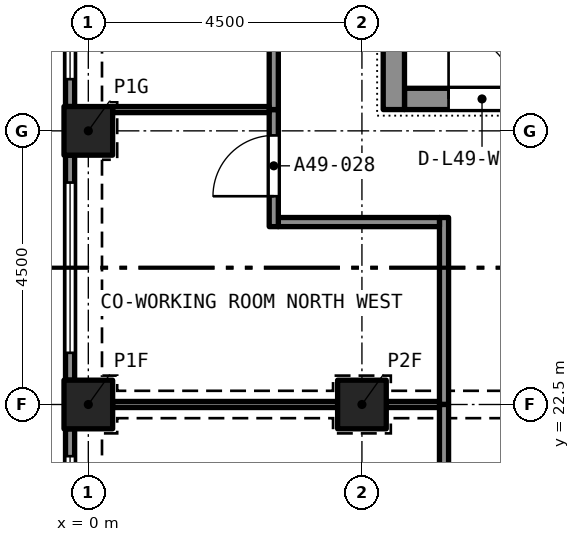
"""IFC4 building model, lengths in metres.
Left out: names, types, materials, properties, quantities, classifications, styles, units other than length and angle.
Written with IfcOpenShell. Run it as: python <this file> out.ifc"""

import sys

from ifc_helpers import new_model, si_unit, direction, frame, frame_2d, origin, origin_2d, place, context, subcontext, project, spatial, rectangle, extrude, element, fill, save


model = new_model("IFC4")
c1 = context("Model", 3, precision=1e-05, world=origin(), true_north=direction((0.0, 1.0)))
c2 = subcontext(c1, "Body", "Model", "MODEL_VIEW")
j1 = project(units=[si_unit("LENGTHUNIT", "METRE"), si_unit("PLANEANGLEUNIT", "RADIAN")], contexts=[c1])
p1 = place(None, origin())
s1 = spatial("IfcSite", under=j1, at=p1, CompositionType="ELEMENT")
p2 = place(p1, origin())
s2 = spatial("IfcBuilding", under=s1, at=p2, CompositionType="ELEMENT")
p3 = place(p2, frame((0.0, 0.0, 179.5)))
s3 = spatial("IfcBuildingStorey", under=s2, at=p3, CompositionType="ELEMENT", Elevation=179.5)
for number, where, z_axis, x_axis in (
    (1, (0.0, 22.5, 0.0), (0.0, 0.0, 1.0), (1.0, 0.0, 0.0)),
    (2, (4.5, 22.5, 0.0), (0.0, 0.0, 1.0), (1.0, 0.0, 0.0)),
    (3, (0.0, 27.0, 0.0), (0.0, 0.0, 1.0), (1.0, 0.0, 0.0)),
):
    element("IfcColumn", number, at=place(p3, frame(where, z_axis=z_axis, x_axis=x_axis)), inside=s3, PredefinedType="COLUMN", context=c2, shape_type="SweptSolid", body=[
        extrude(rectangle(XDim=0.8, YDim=0.8, at=origin_2d()), origin(), (0.0, 0.0, 1.0), 3.2),
    ])
p4 = place(p3, frame((5.2, 27.525, 0.0), z_axis=(0.0, 0.0, 1.0), x_axis=(1.0, 0.0, 0.0)))
e4 = element("IfcWall", 4, at=p4, inside=s3, PredefinedType="SOLIDWALL", context=c2, shape_type="SweptSolid", body=[
    extrude(rectangle(XDim=7.6, YDim=0.35, at=frame_2d((3.8, 0.0))), origin(), (0.0, 0.0, 1.0), 3.2),
])
p5 = place(p4, frame((0.725, 0.0, 0.0)))
e5 = element("IfcOpeningElement", 5, at=p5, cuts=e4, PredefinedType="OPENING", context=c2, shape_type="SweptSolid", body=[
    extrude(rectangle(XDim=1.1, YDim=2.1, at=frame_2d((0.55, 1.05))), frame((0.0, 0.185, 0.0), z_axis=(0.0, -1.0, 0.0), x_axis=(1.0, 0.0, 0.0)), (0.0, 0.0, 1.0), 0.37),
])
p6 = place(p4, frame((3.25, 0.0, 0.0)))
e6 = element("IfcOpeningElement", 6, at=p6, cuts=e4, PredefinedType="OPENING", context=c2, shape_type="SweptSolid", body=[
    extrude(rectangle(XDim=1.1, YDim=2.1, at=frame_2d((0.55, 1.05))), frame((0.0, 0.185, 0.0), z_axis=(0.0, -1.0, 0.0), x_axis=(1.0, 0.0, 0.0)), (0.0, 0.0, 1.0), 0.37),
])
p7 = place(p4, frame((5.775, 0.0, 0.0)))
e7 = element("IfcOpeningElement", 7, at=p7, cuts=e4, PredefinedType="OPENING", context=c2, shape_type="SweptSolid", body=[
    extrude(rectangle(XDim=1.1, YDim=2.1, at=frame_2d((0.55, 1.05))), frame((0.0, 0.185, 0.0), z_axis=(0.0, -1.0, 0.0), x_axis=(1.0, 0.0, 0.0)), (0.0, 0.0, 1.0), 0.37),
])
p8 = place(p3, frame((5.025, 27.35, 0.0), z_axis=(0.0, 0.0, 1.0), x_axis=(0.0, 1.0, 0.0)))
e8 = element("IfcWall", 8, at=p8, inside=s3, PredefinedType="SOLIDWALL", context=c2, shape_type="SweptSolid", body=[
    extrude(rectangle(XDim=12.8, YDim=0.35, at=frame_2d((6.4, 0.0))), origin(), (0.0, 0.0, 1.0), 3.2),
])
p9 = place(p8, frame((8.6, 0.0, 0.0)))
e9 = element("IfcOpeningElement", 9, at=p9, cuts=e8, PredefinedType="OPENING", context=c2, shape_type="SweptSolid", body=[
    extrude(rectangle(XDim=1.2, YDim=2.1, at=frame_2d((0.6, 1.05))), frame((0.0, 0.185, 0.0), z_axis=(0.0, -1.0, 0.0), x_axis=(1.0, 0.0, 0.0)), (0.0, 0.0, 1.0), 0.37),
])
p10 = place(p3, frame((-0.3, 27.4, 0.0), z_axis=(0.0, 0.0, 1.0), x_axis=(0.0, 1.0, 0.0)))
e10 = element("IfcWall", 10, at=p10, inside=s3, PredefinedType="SOLIDWALL", context=c2, shape_type="SweptSolid", body=[
    extrude(rectangle(XDim=3.7, YDim=0.15, at=frame_2d((1.85, 0.0))), origin(), (0.0, 0.0, 1.0), 3.2),
])
p11 = place(p10, frame((0.45, 0.0, 0.45)))
e11 = element("IfcOpeningElement", 11, at=p11, cuts=e10, PredefinedType="OPENING", context=c2, shape_type="SweptSolid", body=[
    extrude(rectangle(XDim=2.8, YDim=1.95, at=frame_2d((1.4, 0.975))), frame((0.0, 0.085, 0.0), z_axis=(0.0, -1.0, 0.0), x_axis=(1.0, 0.0, 0.0)), (0.0, 0.0, 1.0), 0.17),
])
p12 = place(p3, frame((-0.3, 22.9, 0.0), z_axis=(0.0, 0.0, 1.0), x_axis=(0.0, 1.0, 0.0)))
e12 = element("IfcWall", 12, at=p12, inside=s3, PredefinedType="SOLIDWALL", context=c2, shape_type="SweptSolid", body=[
    extrude(rectangle(XDim=3.7, YDim=0.15, at=frame_2d((1.85, 0.0))), origin(), (0.0, 0.0, 1.0), 3.2),
])
p13 = place(p12, frame((0.45, 0.0, 0.45)))
e13 = element("IfcOpeningElement", 13, at=p13, cuts=e12, PredefinedType="OPENING", context=c2, shape_type="SweptSolid", body=[
    extrude(rectangle(XDim=2.8, YDim=1.95, at=frame_2d((1.4, 0.975))), frame((0.0, 0.085, 0.0), z_axis=(0.0, -1.0, 0.0), x_axis=(1.0, 0.0, 0.0)), (0.0, 0.0, 1.0), 0.17),
])
p14 = place(p3, frame((-0.3, 18.4, 0.0), z_axis=(0.0, 0.0, 1.0), x_axis=(0.0, 1.0, 0.0)))
e14 = element("IfcWall", 14, at=p14, inside=s3, PredefinedType="SOLIDWALL", context=c2, shape_type="SweptSolid", body=[
    extrude(rectangle(XDim=3.7, YDim=0.15, at=frame_2d((1.85, 0.0))), origin(), (0.0, 0.0, 1.0), 3.2),
])
p15 = place(p14, frame((0.45, 0.0, 0.45)))
e15 = element("IfcOpeningElement", 15, at=p15, cuts=e14, PredefinedType="OPENING", context=c2, shape_type="SweptSolid", body=[
    extrude(rectangle(XDim=2.8, YDim=1.95, at=frame_2d((1.4, 0.975))), frame((0.0, 0.085, 0.0), z_axis=(0.0, -1.0, 0.0), x_axis=(1.0, 0.0, 0.0)), (0.0, 0.0, 1.0), 0.17),
])
p16 = place(p3, frame((5.85, 22.5, 0.0), z_axis=(0.0, 0.0, 1.0), x_axis=(0.0, 1.0, 0.0)))
e16 = element("IfcWall", 16, at=p16, inside=s3, PredefinedType="PARTITIONING", context=c2, shape_type="SweptSolid", body=[
    extrude(rectangle(XDim=3.075, YDim=0.15, at=frame_2d((1.538, 0.0))), origin(), (0.0, 0.0, 1.0), 2.9),
])
p17 = place(p3, frame((3.125, 25.5, 0.0), z_axis=(0.0, 0.0, 1.0), x_axis=(1.0, 0.0, 0.0)))
e17 = element("IfcWall", 17, at=p17, inside=s3, PredefinedType="PARTITIONING", context=c2, shape_type="SweptSolid", body=[
    extrude(rectangle(XDim=2.65, YDim=0.15, at=frame_2d((1.325, 0.0))), origin(), (0.0, 0.0, 1.0), 2.9),
])
p18 = place(p3, frame((3.05, 25.425, 0.0), z_axis=(0.0, 0.0, 1.0), x_axis=(0.0, 1.0, 0.0)))
e18 = element("IfcWall", 18, at=p18, inside=s3, PredefinedType="PARTITIONING", context=c2, shape_type="SweptSolid", body=[
    extrude(rectangle(XDim=1.925, YDim=0.15, at=frame_2d((0.962, 0.0))), origin(), (0.0, 0.0, 1.0), 2.9),
])
p19 = place(p18, frame((0.5, 0.0, 0.0)))
e19 = element("IfcOpeningElement", 19, at=p19, cuts=e18, PredefinedType="OPENING", context=c2, shape_type="SweptSolid", body=[
    extrude(rectangle(XDim=1.0, YDim=2.1, at=frame_2d((0.5, 1.05))), frame((0.0, 0.085, 0.0), z_axis=(0.0, -1.0, 0.0), x_axis=(1.0, 0.0, 0.0)), (0.0, 0.0, 1.0), 0.17),
])
p20 = place(p3, frame((3.05, 27.35, 0.0), z_axis=(0.0, 0.0, 1.0), x_axis=(0.0, 1.0, 0.0)))
e20 = element("IfcWall", 20, at=p20, inside=s3, PredefinedType="PARTITIONING", context=c2, shape_type="SweptSolid", body=[
    extrude(rectangle(XDim=12.675, YDim=0.15, at=frame_2d((6.337, 0.0))), origin(), (0.0, 0.0, 1.0), 2.9),
])
p21 = place(p20, frame((5.9, 0.0, 0.0)))
e21 = element("IfcOpeningElement", 21, at=p21, cuts=e20, PredefinedType="OPENING", context=c2, shape_type="SweptSolid", body=[
    extrude(rectangle(XDim=1.0, YDim=2.1, at=frame_2d((0.5, 1.05))), frame((0.0, 0.085, 0.0), z_axis=(0.0, -1.0, 0.0), x_axis=(1.0, 0.0, 0.0)), (0.0, 0.0, 1.0), 0.17),
])
p22 = place(p3, frame((5.85, 13.025, 0.0), z_axis=(0.0, 0.0, 1.0), x_axis=(0.0, 1.0, 0.0)))
e22 = element("IfcWall", 22, at=p22, inside=s3, PredefinedType="PARTITIONING", context=c2, shape_type="SweptSolid", body=[
    extrude(rectangle(XDim=9.475, YDim=0.15, at=frame_2d((4.738, 0.0))), origin(), (0.0, 0.0, 1.0), 2.9),
])
p23 = place(p22, frame((4.275, 0.0, 0.0)))
e23 = element("IfcOpeningElement", 23, at=p23, cuts=e22, PredefinedType="OPENING", context=c2, shape_type="SweptSolid", body=[
    extrude(rectangle(XDim=1.0, YDim=2.1, at=frame_2d((0.5, 1.05))), frame((0.0, 0.085, 0.0), z_axis=(0.0, -1.0, 0.0), x_axis=(1.0, 0.0, 0.0)), (0.0, 0.0, 1.0), 0.17),
])
p24 = place(p3, frame((0.4, 27.35, 0.0), z_axis=(0.0, 0.0, 1.0), x_axis=(1.0, 0.0, 0.0)))
e24 = element("IfcWall", 24, at=p24, inside=s3, PredefinedType="PARTITIONING", context=c2, shape_type="SweptSolid", body=[
    extrude(rectangle(XDim=2.575, YDim=0.1, at=frame_2d((1.288, 0.0))), origin(), (0.0, 0.0, 1.0), 2.9),
])
p25 = place(p3, frame((4.9, 22.5, 0.0), z_axis=(0.0, 0.0, 1.0), x_axis=(1.0, 0.0, 0.0)))
e25 = element("IfcWall", 25, at=p25, inside=s3, PredefinedType="PARTITIONING", context=c2, shape_type="SweptSolid", body=[
    extrude(rectangle(XDim=0.875, YDim=0.1, at=frame_2d((0.438, 0.0))), origin(), (0.0, 0.0, 1.0), 2.38),
])
p26 = place(p3, frame((0.4, 22.5, 0.0), z_axis=(0.0, 0.0, 1.0), x_axis=(1.0, 0.0, 0.0)))
e26 = element("IfcWall", 26, at=p26, inside=s3, PredefinedType="PARTITIONING", context=c2, shape_type="SweptSolid", body=[
    extrude(rectangle(XDim=3.7, YDim=0.1, at=frame_2d((1.85, 0.0))), origin(), (0.0, 0.0, 1.0), 2.38),
])
p27 = place(p11, origin())
e27 = element("IfcWindow", 27, at=p27, inside=s3, PartitioningType="SINGLE_PANEL", PredefinedType="WINDOW", context=c2, shape_type="SweptSolid", body=[
    extrude(rectangle(XDim=2.8, YDim=1.95, at=frame_2d((1.4, 0.975))), frame((0.0, 0.03, 0.0), z_axis=(0.0, -1.0, 0.0), x_axis=(1.0, 0.0, 0.0)), (0.0, 0.0, 1.0), 0.06),
])
fill(e11, e27)
p28 = place(p13, origin())
e28 = element("IfcWindow", 28, at=p28, inside=s3, PartitioningType="SINGLE_PANEL", PredefinedType="WINDOW", context=c2, shape_type="SweptSolid", body=[
    extrude(rectangle(XDim=2.8, YDim=1.95, at=frame_2d((1.4, 0.975))), frame((0.0, 0.03, 0.0), z_axis=(0.0, -1.0, 0.0), x_axis=(1.0, 0.0, 0.0)), (0.0, 0.0, 1.0), 0.06),
])
fill(e13, e28)
p29 = place(p15, origin())
e29 = element("IfcWindow", 29, at=p29, inside=s3, PartitioningType="SINGLE_PANEL", PredefinedType="WINDOW", context=c2, shape_type="SweptSolid", body=[
    extrude(rectangle(XDim=2.8, YDim=1.95, at=frame_2d((1.4, 0.975))), frame((0.0, 0.03, 0.0), z_axis=(0.0, -1.0, 0.0), x_axis=(1.0, 0.0, 0.0)), (0.0, 0.0, 1.0), 0.06),
])
fill(e15, e29)
p30 = place(p19, origin())
e30 = element("IfcDoor", 30, at=p30, inside=s3, OperationType="SINGLE_SWING_RIGHT", PredefinedType="DOOR", context=c2, shape_type="SweptSolid", body=[
    extrude(rectangle(XDim=1.0, YDim=2.1, at=frame_2d((0.5, 1.05))), frame((0.0, 0.025, 0.0), z_axis=(0.0, -1.0, 0.0), x_axis=(1.0, 0.0, 0.0)), (0.0, 0.0, 1.0), 0.05),
])
fill(e19, e30)
p31 = place(p5, origin())
e31 = element("IfcDoor", 31, at=p31, inside=s3, OperationType="SINGLE_SWING_LEFT", PredefinedType="DOOR", context=c2, shape_type="SweptSolid", body=[
    extrude(rectangle(XDim=1.1, YDim=2.1, at=frame_2d((0.55, 1.05))), frame((0.0, 0.025, 0.0), z_axis=(0.0, -1.0, 0.0), x_axis=(1.0, 0.0, 0.0)), (0.0, 0.0, 1.0), 0.05),
])
fill(e5, e31)
save(model, sys.argv[1])
